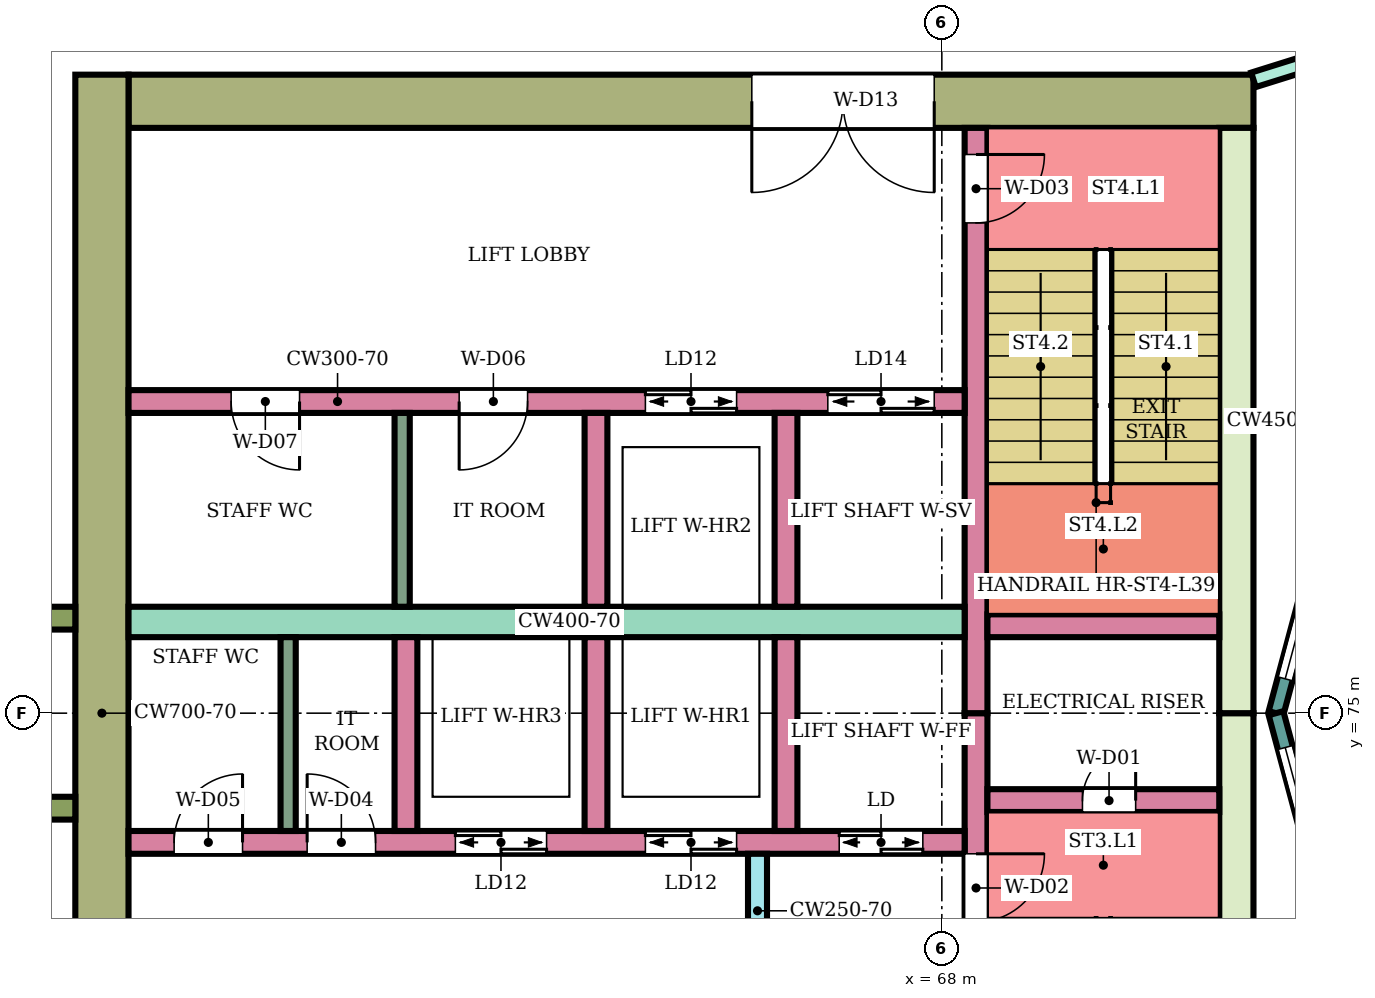
"""IFC4 building model, lengths in metres.
Left out: names, types, materials, properties, quantities, classifications, styles, units other than length and angle.
Written with IfcOpenShell. Run it as: python <this file> out.ifc"""

import sys

from ifc_helpers import new_model, si_unit, direction, frame, frame_2d, origin, place, context, subcontext, project, spatial, rectangle, extrude, element, fill, save


model = new_model("IFC4")
c1 = context("Model", 3, precision=1e-05, world=origin(), true_north=direction((0.0, 1.0)))
c2 = subcontext(c1, "Body", "Model", "MODEL_VIEW")
j1 = project(units=[si_unit("LENGTHUNIT", "METRE"), si_unit("PLANEANGLEUNIT", "RADIAN")], contexts=[c1])
p1 = place(None, origin())
s1 = spatial("IfcSite", under=j1, at=p1, CompositionType="ELEMENT")
p2 = place(p1, origin())
s2 = spatial("IfcBuilding", under=s1, at=p2, CompositionType="ELEMENT")
p3 = place(p2, frame((0.0, 0.0, 170.0)))
s3 = spatial("IfcBuildingStorey", under=s2, at=p3, CompositionType="ELEMENT", Elevation=170.0)
p4 = place(p3, frame((72.1, 83.05, 0.0), z_axis=(0.0, 0.0, 1.0), x_axis=(-1.0, 0.0, 0.0)))
e1 = element("IfcWall", 1, at=p4, inside=s3, PredefinedType="SHEAR", context=c2, shape_type="SweptSolid", body=[
    extrude(rectangle(XDim=14.8, YDim=0.7, at=frame_2d((7.4, 0.0))), origin(), (0.0, 0.0, 1.0), 3.78),
])
p5 = place(p4, frame((4.2, 0.0, 0.0)))
e2 = element("IfcOpeningElement", 2, at=p5, cuts=e1, PredefinedType="OPENING", context=c2, shape_type="SweptSolid", body=[
    extrude(rectangle(XDim=2.4, YDim=2.4, at=frame_2d((1.2, 1.2))), frame((0.0, 0.36, 0.0), z_axis=(0.0, -1.0, 0.0), x_axis=(1.0, 0.0, 0.0)), (0.0, 0.0, 1.0), 0.72),
])
for number, where, z_axis, x_axis in (
    (3, (71.875, 75.0, 0.0), (0.0, 0.0, 1.0), (0.0, -1.0, 0.0)),
    (4, (71.875, 82.7, 0.0), (0.0, 0.0, 1.0), (0.0, -1.0, 0.0)),
):
    element("IfcWall", number, at=place(p3, frame(where, z_axis=z_axis, x_axis=x_axis)), inside=s3, PredefinedType="SHEAR", context=c2, shape_type="SweptSolid", body=[
        extrude(rectangle(XDim=7.7, YDim=0.45, at=frame_2d((3.85, 0.0))), origin(), (0.0, 0.0, 1.0), 3.78),
    ])
p6 = place(p3, frame((56.95, 83.4, 0.0), z_axis=(0.0, 0.0, 1.0), x_axis=(0.0, -1.0, 0.0)))
e5 = element("IfcWall", 5, at=p6, inside=s3, PredefinedType="SHEAR", context=c2, shape_type="SweptSolid", body=[
    extrude(rectangle(XDim=16.8, YDim=0.7, at=frame_2d((8.4, 0.0))), origin(), (0.0, 0.0, 1.0), 3.78),
])
p7 = place(p3, frame((68.45, 75.0, 0.0), z_axis=(0.0, 0.0, 1.0), x_axis=(0.0, -1.0, 0.0)))
e6 = element("IfcWall", 6, at=p7, inside=s3, PredefinedType="SHEAR", context=c2, shape_type="SweptSolid", body=[
    extrude(rectangle(XDim=7.7, YDim=0.3, at=frame_2d((3.85, 0.0))), origin(), (0.0, 0.0, 1.0), 3.78),
])
p8 = place(p7, frame((1.85, 0.0, 0.0)))
e7 = element("IfcOpeningElement", 7, at=p8, cuts=e6, PredefinedType="OPENING", context=c2, shape_type="SweptSolid", body=[
    extrude(rectangle(XDim=0.9, YDim=2.1, at=frame_2d((0.45, 1.05))), frame((0.0, 0.16, 0.0), z_axis=(0.0, -1.0, 0.0), x_axis=(1.0, 0.0, 0.0)), (0.0, 0.0, 1.0), 0.32),
])
p9 = place(p3, frame((68.45, 82.7, 0.0), z_axis=(0.0, 0.0, 1.0), x_axis=(0.0, -1.0, 0.0)))
e8 = element("IfcWall", 8, at=p9, inside=s3, PredefinedType="SHEAR", context=c2, shape_type="SweptSolid", body=[
    extrude(rectangle(XDim=7.7, YDim=0.3, at=frame_2d((3.85, 0.0))), origin(), (0.0, 0.0, 1.0), 3.78),
])
p10 = place(p9, frame((0.35, 0.0, 0.0)))
e9 = element("IfcOpeningElement", 9, at=p10, cuts=e8, PredefinedType="OPENING", context=c2, shape_type="SweptSolid", body=[
    extrude(rectangle(XDim=0.9, YDim=2.1, at=frame_2d((0.45, 1.05))), frame((0.0, 0.16, 0.0), z_axis=(0.0, -1.0, 0.0), x_axis=(1.0, 0.0, 0.0)), (0.0, 0.0, 1.0), 0.32),
])
p11 = place(p3, frame((71.65, 73.85, 0.0), z_axis=(0.0, 0.0, 1.0), x_axis=(-1.0, 0.0, 0.0)))
e10 = element("IfcWall", 10, at=p11, inside=s3, PredefinedType="SHEAR", context=c2, shape_type="SweptSolid", body=[
    extrude(rectangle(XDim=3.05, YDim=0.3, at=frame_2d((1.525, 0.0))), origin(), (0.0, 0.0, 1.0), 3.78),
])
p12 = place(p11, frame((1.1, 0.0, 0.0)))
e11 = element("IfcOpeningElement", 11, at=p12, cuts=e10, PredefinedType="OPENING", context=c2, shape_type="SweptSolid", body=[
    extrude(rectangle(XDim=0.7, YDim=2.0, at=frame_2d((0.35, 1.0))), frame((0.0, 0.16, 0.0), z_axis=(0.0, -1.0, 0.0), x_axis=(1.0, 0.0, 0.0)), (0.0, 0.0, 1.0), 0.32),
])
p13 = place(p3, frame((71.65, 76.15, 0.0), z_axis=(0.0, 0.0, 1.0), x_axis=(-1.0, 0.0, 0.0)))
e12 = element("IfcWall", 12, at=p13, inside=s3, PredefinedType="SHEAR", context=c2, shape_type="SweptSolid", body=[
    extrude(rectangle(XDim=3.05, YDim=0.3, at=frame_2d((1.525, 0.0))), origin(), (0.0, 0.0, 1.0), 3.78),
])
p14 = place(p3, frame((68.3, 73.3, 0.0), z_axis=(0.0, 0.0, 1.0), x_axis=(-1.0, 0.0, 0.0)))
e13 = element("IfcWall", 13, at=p14, inside=s3, PredefinedType="SHEAR", context=c2, shape_type="SweptSolid", body=[
    extrude(rectangle(XDim=11.0, YDim=0.3, at=frame_2d((5.5, 0.0))), origin(), (0.0, 0.0, 1.0), 3.78),
])
p15 = place(p14, frame((0.55, 0.0, 0.0)))
e14 = element("IfcOpeningElement", 14, at=p15, cuts=e13, PredefinedType="OPENING", context=c2, shape_type="SweptSolid", body=[
    extrude(rectangle(XDim=1.1, YDim=2.1, at=frame_2d((0.55, 1.05))), frame((0.0, 0.16, 0.0), z_axis=(0.0, -1.0, 0.0), x_axis=(1.0, 0.0, 0.0)), (0.0, 0.0, 1.0), 0.32),
])
p16 = place(p14, frame((3.0, 0.0, 0.0)))
e15 = element("IfcOpeningElement", 15, at=p16, cuts=e13, PredefinedType="OPENING", context=c2, shape_type="SweptSolid", body=[
    extrude(rectangle(XDim=1.2, YDim=2.1, at=frame_2d((0.6, 1.05))), frame((0.0, 0.16, 0.0), z_axis=(0.0, -1.0, 0.0), x_axis=(1.0, 0.0, 0.0)), (0.0, 0.0, 1.0), 0.32),
])
p17 = place(p14, frame((5.5, 0.0, 0.0)))
e16 = element("IfcOpeningElement", 16, at=p17, cuts=e13, PredefinedType="OPENING", context=c2, shape_type="SweptSolid", body=[
    extrude(rectangle(XDim=1.2, YDim=2.1, at=frame_2d((0.6, 1.05))), frame((0.0, 0.16, 0.0), z_axis=(0.0, -1.0, 0.0), x_axis=(1.0, 0.0, 0.0)), (0.0, 0.0, 1.0), 0.32),
])
p18 = place(p14, frame((7.75, 0.0, 0.0)))
e17 = element("IfcOpeningElement", 17, at=p18, cuts=e13, PredefinedType="OPENING", context=c2, shape_type="SweptSolid", body=[
    extrude(rectangle(XDim=0.9, YDim=2.1, at=frame_2d((0.45, 1.05))), frame((0.0, 0.16, 0.0), z_axis=(0.0, -1.0, 0.0), x_axis=(1.0, 0.0, 0.0)), (0.0, 0.0, 1.0), 0.32),
])
p19 = place(p14, frame((9.5, 0.0, 0.0)))
e18 = element("IfcOpeningElement", 18, at=p19, cuts=e13, PredefinedType="OPENING", context=c2, shape_type="SweptSolid", body=[
    extrude(rectangle(XDim=0.9, YDim=2.1, at=frame_2d((0.45, 1.05))), frame((0.0, 0.16, 0.0), z_axis=(0.0, -1.0, 0.0), x_axis=(1.0, 0.0, 0.0)), (0.0, 0.0, 1.0), 0.32),
])
p20 = place(p3, frame((68.3, 76.2, 0.0), z_axis=(0.0, 0.0, 1.0), x_axis=(-1.0, 0.0, 0.0)))
e19 = element("IfcWall", 19, at=p20, inside=s3, PredefinedType="SHEAR", context=c2, shape_type="SweptSolid", body=[
    extrude(rectangle(XDim=11.0, YDim=0.4, at=frame_2d((5.5, 0.0))), origin(), (0.0, 0.0, 1.0), 3.78),
])
p21 = place(p3, frame((68.3, 79.1, 0.0), z_axis=(0.0, 0.0, 1.0), x_axis=(-1.0, 0.0, 0.0)))
e20 = element("IfcWall", 20, at=p21, inside=s3, PredefinedType="SHEAR", context=c2, shape_type="SweptSolid", body=[
    extrude(rectangle(XDim=11.0, YDim=0.3, at=frame_2d((5.5, 0.0))), origin(), (0.0, 0.0, 1.0), 3.78),
])
p22 = place(p21, frame((0.4, 0.0, 0.0)))
e21 = element("IfcOpeningElement", 21, at=p22, cuts=e20, PredefinedType="OPENING", context=c2, shape_type="SweptSolid", body=[
    extrude(rectangle(XDim=1.4, YDim=2.1, at=frame_2d((0.7, 1.05))), frame((0.0, 0.16, 0.0), z_axis=(0.0, -1.0, 0.0), x_axis=(1.0, 0.0, 0.0)), (0.0, 0.0, 1.0), 0.32),
])
p23 = place(p21, frame((3.0, 0.0, 0.0)))
e22 = element("IfcOpeningElement", 22, at=p23, cuts=e20, PredefinedType="OPENING", context=c2, shape_type="SweptSolid", body=[
    extrude(rectangle(XDim=1.2, YDim=2.1, at=frame_2d((0.6, 1.05))), frame((0.0, 0.16, 0.0), z_axis=(0.0, -1.0, 0.0), x_axis=(1.0, 0.0, 0.0)), (0.0, 0.0, 1.0), 0.32),
])
p24 = place(p21, frame((5.75, 0.0, 0.0)))
e23 = element("IfcOpeningElement", 23, at=p24, cuts=e20, PredefinedType="OPENING", context=c2, shape_type="SweptSolid", body=[
    extrude(rectangle(XDim=0.9, YDim=2.1, at=frame_2d((0.45, 1.05))), frame((0.0, 0.16, 0.0), z_axis=(0.0, -1.0, 0.0), x_axis=(1.0, 0.0, 0.0)), (0.0, 0.0, 1.0), 0.32),
])
p25 = place(p21, frame((8.75, 0.0, 0.0)))
e24 = element("IfcOpeningElement", 24, at=p25, cuts=e20, PredefinedType="OPENING", context=c2, shape_type="SweptSolid", body=[
    extrude(rectangle(XDim=0.9, YDim=2.1, at=frame_2d((0.45, 1.05))), frame((0.0, 0.16, 0.0), z_axis=(0.0, -1.0, 0.0), x_axis=(1.0, 0.0, 0.0)), (0.0, 0.0, 1.0), 0.32),
])
for number, where, z_axis, x_axis in (
    (25, (65.95, 76.0, 0.0), (0.0, 0.0, 1.0), (0.0, -1.0, 0.0)),
    (26, (63.45, 76.0, 0.0), (0.0, 0.0, 1.0), (0.0, -1.0, 0.0)),
    (27, (60.95, 76.0, 0.0), (0.0, 0.0, 1.0), (0.0, -1.0, 0.0)),
    (28, (65.95, 78.95, 0.0), (0.0, 0.0, 1.0), (0.0, -1.0, 0.0)),
    (29, (63.45, 78.95, 0.0), (0.0, 0.0, 1.0), (0.0, -1.0, 0.0)),
):
    element("IfcWall", number, at=place(p3, frame(where, z_axis=z_axis, x_axis=x_axis)), inside=s3, PredefinedType="SHEAR", context=c2, shape_type="SweptSolid", body=[
        extrude(rectangle(XDim=2.55, YDim=0.3, at=frame_2d((1.275, 0.0))), origin(), (0.0, 0.0, 1.0), 3.78),
    ])
p26 = place(p3, frame((65.575, 73.15, 0.0), z_axis=(0.0, 0.0, 1.0), x_axis=(0.0, -1.0, 0.0)))
e30 = element("IfcWall", 30, at=p26, inside=s3, PredefinedType="SHEAR", context=c2, shape_type="SweptSolid", body=[
    extrude(rectangle(XDim=1.5, YDim=0.25, at=frame_2d((0.75, 0.0))), origin(), (0.0, 0.0, 1.0), 3.78),
])
for number, where, z_axis, x_axis in (
    (31, (56.6, 76.25, 0.0), (0.0, 0.0, 1.0), (-1.0, 0.0, 0.0)),
    (32, (56.6, 73.75, 0.0), (0.0, 0.0, 1.0), (-1.0, 0.0, 0.0)),
):
    element("IfcWall", number, at=place(p3, frame(where, z_axis=z_axis, x_axis=x_axis)), inside=s3, PredefinedType="NOTDEFINED", context=c2, shape_type="SweptSolid", body=[
        extrude(rectangle(XDim=2.416, YDim=0.3, at=frame_2d((1.208, 0.0))), origin(), (0.0, 0.0, 1.0), 4.1),
    ])
p27 = place(p3, frame((73.415, 78.802, 0.0), z_axis=(0.0, 0.0, 1.0), x_axis=(-0.258789828301, -0.965933654434, 0.0)))
e33 = element("IfcWall", 33, at=p27, inside=s3, PredefinedType="NOTDEFINED", context=c2, shape_type="SweptSolid", body=[
    extrude(rectangle(XDim=3.936, YDim=0.2, at=frame_2d((1.968, 0.0))), origin(), (0.0, 0.0, 1.0), 4.1),
])
p28 = place(p27, frame((0.468, 0.0, 0.9)))
e34 = element("IfcOpeningElement", 34, at=p28, cuts=e33, PredefinedType="OPENING", context=c2, shape_type="SweptSolid", body=[
    extrude(rectangle(XDim=3.0, YDim=2.3, at=frame_2d((1.5, 1.15))), frame((0.0, 0.11, 0.0), z_axis=(0.0, -1.0, 0.0), x_axis=(1.0, 0.0, 0.0)), (0.0, 0.0, 1.0), 0.22),
])
p29 = place(p3, frame((72.396, 75.0, 0.0), z_axis=(0.0, 0.0, 1.0), x_axis=(0.258789828301, -0.965933654434, 0.0)))
e35 = element("IfcWall", 35, at=p29, inside=s3, PredefinedType="NOTDEFINED", context=c2, shape_type="SweptSolid", body=[
    extrude(rectangle(XDim=3.936, YDim=0.2, at=frame_2d((1.968, 0.0))), origin(), (0.0, 0.0, 1.0), 4.1),
])
p30 = place(p29, frame((0.468, 0.0, 0.9)))
e36 = element("IfcOpeningElement", 36, at=p30, cuts=e35, PredefinedType="OPENING", context=c2, shape_type="SweptSolid", body=[
    extrude(rectangle(XDim=3.0, YDim=2.3, at=frame_2d((1.5, 1.15))), frame((0.0, 0.11, 0.0), z_axis=(0.0, -1.0, 0.0), x_axis=(1.0, 0.0, 0.0)), (0.0, 0.0, 1.0), 0.22),
])
p31 = place(p3, frame((72.1, 83.332, 0.0), z_axis=(0.0, 0.0, 1.0), x_axis=(0.954233106619, 0.299063836383, 0.0)))
e37 = element("IfcWall", 37, at=p31, inside=s3, PredefinedType="PARTITIONING", context=c2, shape_type="SweptSolid", body=[
    extrude(rectangle(XDim=2.414, YDim=0.2, at=frame_2d((1.207, 0.0))), origin(), (0.0, 0.0, 1.0), 3.65),
])
p32 = place(p31, frame((0.762, 0.0, 0.0)))
e38 = element("IfcOpeningElement", 38, at=p32, cuts=e37, PredefinedType="OPENING", context=c2, shape_type="SweptSolid", body=[
    extrude(rectangle(XDim=0.9, YDim=2.1, at=frame_2d((0.45, 1.05))), frame((0.0, 0.11, 0.0), z_axis=(0.0, -1.0, 0.0), x_axis=(1.0, 0.0, 0.0)), (0.0, 0.0, 1.0), 0.22),
])
for number, where, z_axis, x_axis in (
    (39, (59.4, 76.0, 0.0), (0.0, 0.0, 1.0), (0.0, -1.0, 0.0)),
    (40, (60.9, 78.95, 0.0), (0.0, 0.0, 1.0), (0.0, -1.0, 0.0)),
):
    element("IfcWall", number, at=place(p3, frame(where, z_axis=z_axis, x_axis=x_axis)), inside=s3, PredefinedType="PARTITIONING", context=c2, shape_type="SweptSolid", body=[
        extrude(rectangle(XDim=2.55, YDim=0.2, at=frame_2d((1.275, 0.0))), origin(), (0.0, 0.0, 1.0), 3.78),
    ])
p33 = place(p28, origin())
e41 = element("IfcWindow", 41, at=p33, inside=s3, PartitioningType="SINGLE_PANEL", PredefinedType="WINDOW", context=c2, shape_type="SweptSolid", body=[
    extrude(rectangle(XDim=3.0, YDim=2.3, at=frame_2d((1.5, 1.15))), frame((0.0, 0.03, 0.0), z_axis=(0.0, -1.0, 0.0), x_axis=(1.0, 0.0, 0.0)), (0.0, 0.0, 1.0), 0.06),
])
fill(e34, e41)
p34 = place(p30, origin())
e42 = element("IfcWindow", 42, at=p34, inside=s3, PartitioningType="SINGLE_PANEL", PredefinedType="WINDOW", context=c2, shape_type="SweptSolid", body=[
    extrude(rectangle(XDim=3.0, YDim=2.3, at=frame_2d((1.5, 1.15))), frame((0.0, 0.03, 0.0), z_axis=(0.0, -1.0, 0.0), x_axis=(1.0, 0.0, 0.0)), (0.0, 0.0, 1.0), 0.06),
])
fill(e36, e42)
p35 = place(p12, frame((0.7, 0.0, 0.0), z_axis=(0.0, 0.0, 1.0), x_axis=(-1.0, 0.0, 0.0)))
e43 = element("IfcDoor", 43, at=p35, inside=s3, OperationType="SINGLE_SWING_RIGHT", PredefinedType="DOOR", context=c2, shape_type="SweptSolid", body=[
    extrude(rectangle(XDim=0.7, YDim=2.0, at=frame_2d((0.35, 1.0))), frame((0.0, 0.025, 0.0), z_axis=(0.0, -1.0, 0.0), x_axis=(1.0, 0.0, 0.0)), (0.0, 0.0, 1.0), 0.05),
])
fill(e11, e43)
p36 = place(p8, origin())
e44 = element("IfcDoor", 44, at=p36, inside=s3, OperationType="SINGLE_SWING_LEFT", PredefinedType="DOOR", context=c2, shape_type="SweptSolid", body=[
    extrude(rectangle(XDim=0.9, YDim=2.1, at=frame_2d((0.45, 1.05))), frame((0.0, 0.025, 0.0), z_axis=(0.0, -1.0, 0.0), x_axis=(1.0, 0.0, 0.0)), (0.0, 0.0, 1.0), 0.05),
])
fill(e7, e44)
p37 = place(p10, origin())
e45 = element("IfcDoor", 45, at=p37, inside=s3, OperationType="SINGLE_SWING_LEFT", PredefinedType="DOOR", context=c2, shape_type="SweptSolid", body=[
    extrude(rectangle(XDim=0.9, YDim=2.1, at=frame_2d((0.45, 1.05))), frame((0.0, 0.025, 0.0), z_axis=(0.0, -1.0, 0.0), x_axis=(1.0, 0.0, 0.0)), (0.0, 0.0, 1.0), 0.05),
])
fill(e9, e45)
p38 = place(p15, origin())
e46 = element("IfcDoor", 46, at=p38, inside=s3, OperationType="DOUBLE_DOOR_SLIDING", PredefinedType="DOOR", context=c2, shape_type="SweptSolid", body=[
    extrude(rectangle(XDim=1.1, YDim=2.1, at=frame_2d((0.55, 1.05))), frame((0.0, 0.025, 0.0), z_axis=(0.0, -1.0, 0.0), x_axis=(1.0, 0.0, 0.0)), (0.0, 0.0, 1.0), 0.05),
])
fill(e14, e46)
p39 = place(p16, origin())
e47 = element("IfcDoor", 47, at=p39, inside=s3, OperationType="DOUBLE_DOOR_SLIDING", PredefinedType="DOOR", context=c2, shape_type="SweptSolid", body=[
    extrude(rectangle(XDim=1.2, YDim=2.1, at=frame_2d((0.6, 1.05))), frame((0.0, 0.025, 0.0), z_axis=(0.0, -1.0, 0.0), x_axis=(1.0, 0.0, 0.0)), (0.0, 0.0, 1.0), 0.05),
])
fill(e15, e47)
p40 = place(p17, origin())
e48 = element("IfcDoor", 48, at=p40, inside=s3, OperationType="DOUBLE_DOOR_SLIDING", PredefinedType="DOOR", context=c2, shape_type="SweptSolid", body=[
    extrude(rectangle(XDim=1.2, YDim=2.1, at=frame_2d((0.6, 1.05))), frame((0.0, 0.025, 0.0), z_axis=(0.0, -1.0, 0.0), x_axis=(1.0, 0.0, 0.0)), (0.0, 0.0, 1.0), 0.05),
])
fill(e16, e48)
p41 = place(p18, frame((0.9, 0.0, 0.0), z_axis=(0.0, 0.0, 1.0), x_axis=(-1.0, 0.0, 0.0)))
e49 = element("IfcDoor", 49, at=p41, inside=s3, OperationType="SINGLE_SWING_LEFT", PredefinedType="DOOR", context=c2, shape_type="SweptSolid", body=[
    extrude(rectangle(XDim=0.9, YDim=2.1, at=frame_2d((0.45, 1.05))), frame((0.0, 0.025, 0.0), z_axis=(0.0, -1.0, 0.0), x_axis=(1.0, 0.0, 0.0)), (0.0, 0.0, 1.0), 0.05),
])
fill(e17, e49)
p42 = place(p19, frame((0.9, 0.0, 0.0), z_axis=(0.0, 0.0, 1.0), x_axis=(-1.0, 0.0, 0.0)))
e50 = element("IfcDoor", 50, at=p42, inside=s3, OperationType="SINGLE_SWING_RIGHT", PredefinedType="DOOR", context=c2, shape_type="SweptSolid", body=[
    extrude(rectangle(XDim=0.9, YDim=2.1, at=frame_2d((0.45, 1.05))), frame((0.0, 0.025, 0.0), z_axis=(0.0, -1.0, 0.0), x_axis=(1.0, 0.0, 0.0)), (0.0, 0.0, 1.0), 0.05),
])
fill(e18, e50)
p43 = place(p22, origin())
e51 = element("IfcDoor", 51, at=p43, inside=s3, OperationType="DOUBLE_DOOR_SLIDING", PredefinedType="DOOR", context=c2, shape_type="SweptSolid", body=[
    extrude(rectangle(XDim=1.4, YDim=2.1, at=frame_2d((0.7, 1.05))), frame((0.0, 0.025, 0.0), z_axis=(0.0, -1.0, 0.0), x_axis=(1.0, 0.0, 0.0)), (0.0, 0.0, 1.0), 0.05),
])
fill(e21, e51)
p44 = place(p23, origin())
e52 = element("IfcDoor", 52, at=p44, inside=s3, OperationType="DOUBLE_DOOR_SLIDING", PredefinedType="DOOR", context=c2, shape_type="SweptSolid", body=[
    extrude(rectangle(XDim=1.2, YDim=2.1, at=frame_2d((0.6, 1.05))), frame((0.0, 0.025, 0.0), z_axis=(0.0, -1.0, 0.0), x_axis=(1.0, 0.0, 0.0)), (0.0, 0.0, 1.0), 0.05),
])
fill(e22, e52)
p45 = place(p24, origin())
e53 = element("IfcDoor", 53, at=p45, inside=s3, OperationType="SINGLE_SWING_RIGHT", PredefinedType="DOOR", context=c2, shape_type="SweptSolid", body=[
    extrude(rectangle(XDim=0.9, YDim=2.1, at=frame_2d((0.45, 1.05))), frame((0.0, 0.025, 0.0), z_axis=(0.0, -1.0, 0.0), x_axis=(1.0, 0.0, 0.0)), (0.0, 0.0, 1.0), 0.05),
])
fill(e23, e53)
p46 = place(p25, origin())
e54 = element("IfcDoor", 54, at=p46, inside=s3, OperationType="SINGLE_SWING_LEFT", PredefinedType="DOOR", context=c2, shape_type="SweptSolid", body=[
    extrude(rectangle(XDim=0.9, YDim=2.1, at=frame_2d((0.45, 1.05))), frame((0.0, 0.025, 0.0), z_axis=(0.0, -1.0, 0.0), x_axis=(1.0, 0.0, 0.0)), (0.0, 0.0, 1.0), 0.05),
])
fill(e24, e54)
p47 = place(p5, origin())
e55 = element("IfcDoor", 55, at=p47, inside=s3, OperationType="DOUBLE_DOOR_SINGLE_SWING", PredefinedType="DOOR", context=c2, shape_type="SweptSolid", body=[
    extrude(rectangle(XDim=2.4, YDim=2.4, at=frame_2d((1.2, 1.2))), frame((0.0, 0.025, 0.0), z_axis=(0.0, -1.0, 0.0), x_axis=(1.0, 0.0, 0.0)), (0.0, 0.0, 1.0), 0.05),
])
fill(e2, e55)
save(model, sys.argv[1])
